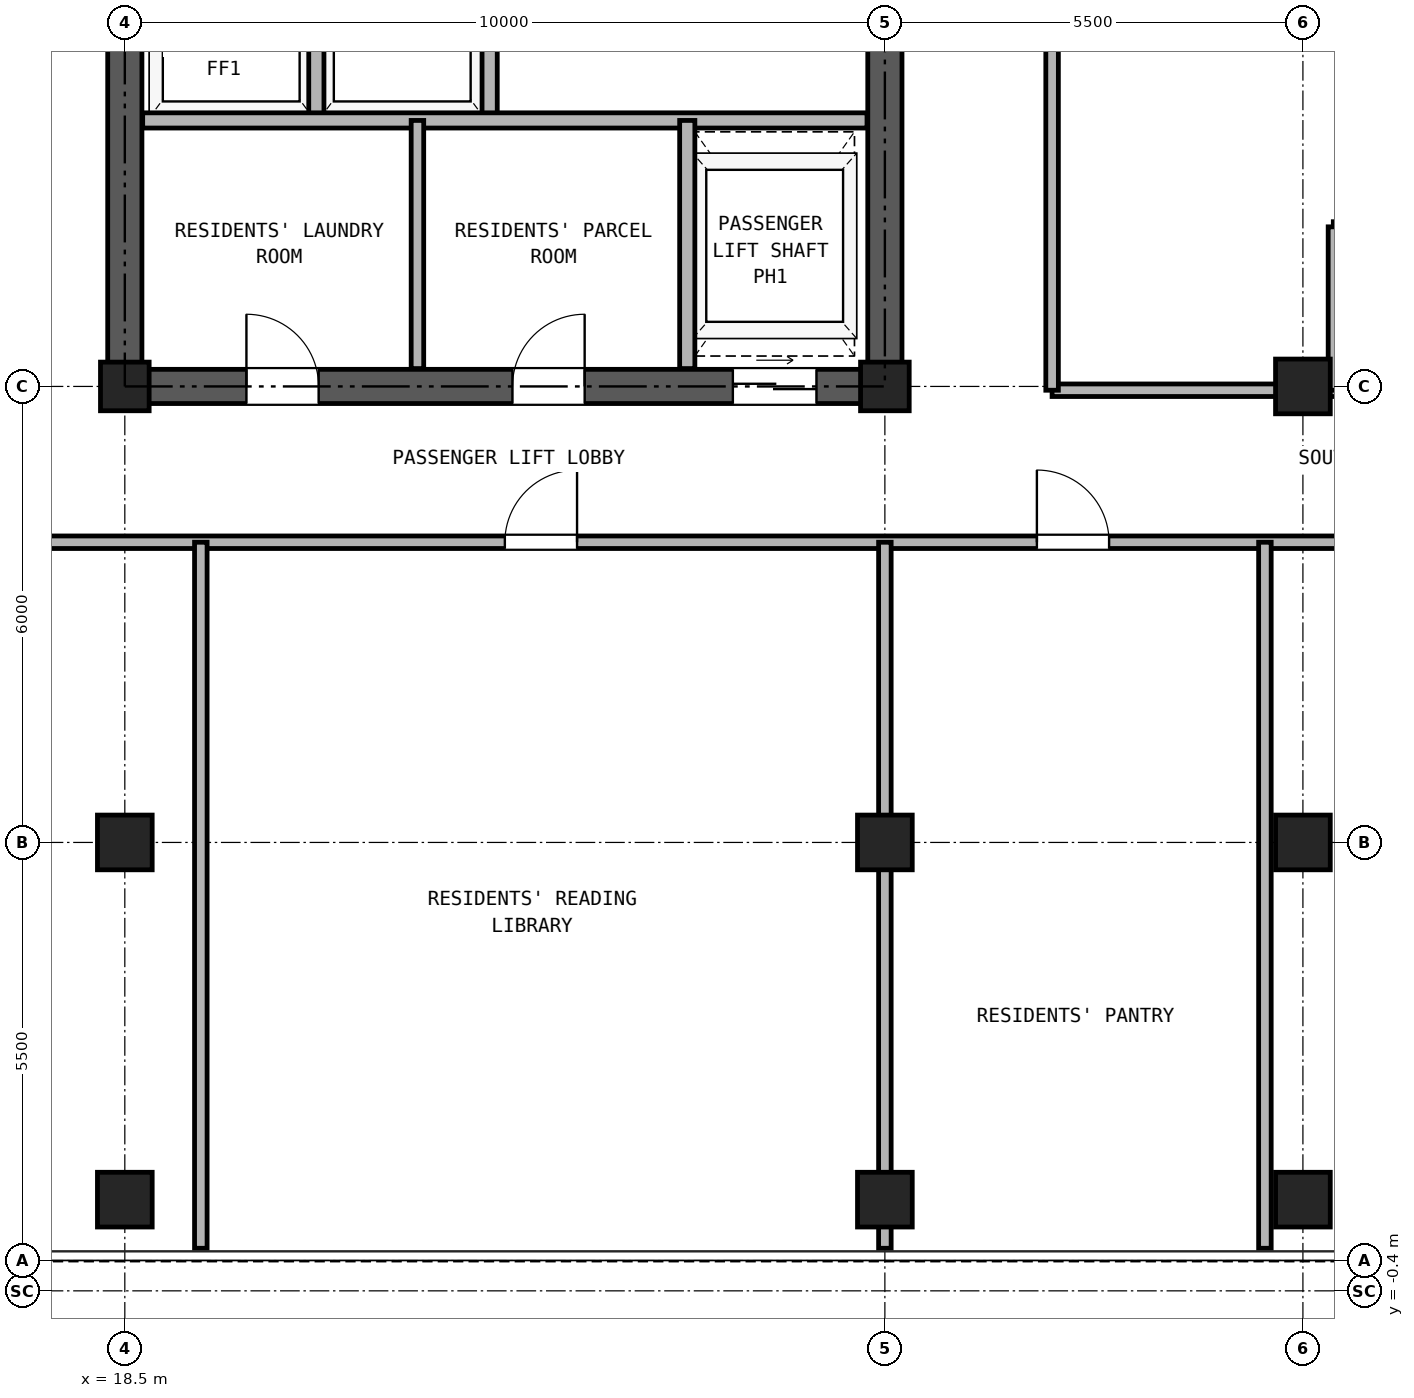
"""IFC4 building model, lengths in metres.
Left out: names, types, materials, properties, quantities, classifications, styles, units other than length and angle.
Written with IfcOpenShell. Run it as: python <this file> out.ifc"""

import sys

from ifc_helpers import new_model, si_unit, direction, frame, frame_2d, origin, origin_2d, place, context, subcontext, project, spatial, rectangle, hollow_rectangle, extrude, source, transform, mapped, element, fill, save


model = new_model("IFC4")
c1 = context("Model", 3, precision=1e-05, world=origin(), true_north=direction((0.0, 1.0)))
c2 = subcontext(c1, "Body", "Model", "MODEL_VIEW")
j1 = project(units=[si_unit("LENGTHUNIT", "METRE"), si_unit("PLANEANGLEUNIT", "RADIAN")], contexts=[c1])
p1 = place(None, origin())
s1 = spatial("IfcSite", under=j1, at=p1, CompositionType="ELEMENT")
p2 = place(p1, origin())
s2 = spatial("IfcBuilding", under=s1, at=p2, CompositionType="ELEMENT")
p3 = place(p2, frame((0.0, 0.0, 172.1)))
s3 = spatial("IfcBuildingStorey", under=s2, at=p3, CompositionType="ELEMENT", Elevation=172.1)
m1 = source(origin(), c2, "Body", "SweptSolid", [
    extrude(hollow_rectangle(XDim=0.72, YDim=0.72, WallThickness=0.04, at=origin_2d()), origin(), (0.0, 0.0, 1.0), 2.95),
])
for number, where, z_axis, x_axis in (
    (1, (18.5, 0.8, 0.0), (0.0, 0.0, 1.0), (1.0, 0.0, 0.0)),
    (2, (28.5, 0.8, 0.0), (0.0, 0.0, 1.0), (1.0, 0.0, 0.0)),
    (3, (34.0, 0.8, 0.0), (0.0, 0.0, 1.0), (1.0, 0.0, 0.0)),
    (4, (18.5, 5.5, 0.0), (0.0, 0.0, 1.0), (1.0, 0.0, 0.0)),
):
    element("IfcColumn", number, at=place(p3, frame(where, z_axis=z_axis, x_axis=x_axis)), inside=s3, PredefinedType="COLUMN", context=c2, shape_type="MappedRepresentation", body=[
        mapped(m1, transform((0.0, 0.0, 0.0), x_axis=(1.0, 0.0, 0.0), y_axis=(0.0, 1.0, 0.0), z_axis=(0.0, 0.0, 1.0), scale=1.0)),
    ])
m2 = source(origin(), c2, "Body", "SweptSolid", [
    extrude(hollow_rectangle(XDim=0.64, YDim=0.64, WallThickness=0.035, at=origin_2d()), origin(), (0.0, 0.0, 1.0), 2.95),
])
p4 = place(p3, frame((18.5, 11.5, 0.0), z_axis=(0.0, 0.0, 1.0), x_axis=(1.0, 0.0, 0.0)))
e5 = element("IfcColumn", 5, at=p4, inside=s3, PredefinedType="COLUMN", context=c2, shape_type="MappedRepresentation", body=[
    mapped(m2, transform((0.0, 0.0, 0.0), x_axis=(1.0, 0.0, 0.0), y_axis=(0.0, 1.0, 0.0), z_axis=(0.0, 0.0, 1.0), scale=1.0)),
])
p5 = place(p3, frame((28.5, 5.5, 0.0), z_axis=(0.0, 0.0, 1.0), x_axis=(1.0, 0.0, 0.0)))
e6 = element("IfcColumn", 6, at=p5, inside=s3, PredefinedType="COLUMN", context=c2, shape_type="MappedRepresentation", body=[
    mapped(m1, transform((0.0, 0.0, 0.0), x_axis=(1.0, 0.0, 0.0), y_axis=(0.0, 1.0, 0.0), z_axis=(0.0, 0.0, 1.0), scale=1.0)),
])
p6 = place(p3, frame((28.5, 11.5, 0.0), z_axis=(0.0, 0.0, 1.0), x_axis=(1.0, 0.0, 0.0)))
e7 = element("IfcColumn", 7, at=p6, inside=s3, PredefinedType="COLUMN", context=c2, shape_type="MappedRepresentation", body=[
    mapped(m2, transform((0.0, 0.0, 0.0), x_axis=(1.0, 0.0, 0.0), y_axis=(0.0, 1.0, 0.0), z_axis=(0.0, 0.0, 1.0), scale=1.0)),
])
for number, where, z_axis, x_axis in (
    (8, (34.0, 5.5, 0.0), (0.0, 0.0, 1.0), (1.0, 0.0, 0.0)),
    (9, (34.0, 11.5, 0.0), (0.0, 0.0, 1.0), (1.0, 0.0, 0.0)),
):
    element("IfcColumn", number, at=place(p3, frame(where, z_axis=z_axis, x_axis=x_axis)), inside=s3, PredefinedType="COLUMN", context=c2, shape_type="MappedRepresentation", body=[
        mapped(m1, transform((0.0, 0.0, 0.0), x_axis=(1.0, 0.0, 0.0), y_axis=(0.0, 1.0, 0.0), z_axis=(0.0, 0.0, 1.0), scale=1.0)),
    ])
p7 = place(p3, frame((18.275, 11.5, 0.0), z_axis=(0.0, 0.0, 1.0), x_axis=(1.0, 0.0, 0.0)))
e10 = element("IfcWall", 10, at=p7, inside=s3, PredefinedType="SHEAR", context=c2, shape_type="SweptSolid", body=[
    extrude(rectangle(XDim=10.45, YDim=0.45, at=frame_2d((5.225, 0.0))), origin(), (0.0, 0.0, 1.0), 2.95),
])
p8 = place(p7, frame((1.825, 0.0, 0.0)))
e11 = element("IfcOpeningElement", 11, at=p8, cuts=e10, PredefinedType="OPENING", context=c2, shape_type="SweptSolid", body=[
    extrude(rectangle(XDim=0.95, YDim=2.15, at=frame_2d((0.475, 1.075))), frame((0.0, 0.235, 0.0), z_axis=(0.0, -1.0, 0.0), x_axis=(1.0, 0.0, 0.0)), (0.0, 0.0, 1.0), 0.47),
])
p9 = place(p7, frame((5.325, 0.0, 0.0)))
e12 = element("IfcOpeningElement", 12, at=p9, cuts=e10, PredefinedType="OPENING", context=c2, shape_type="SweptSolid", body=[
    extrude(rectangle(XDim=0.95, YDim=2.15, at=frame_2d((0.475, 1.075))), frame((0.0, 0.235, 0.0), z_axis=(0.0, -1.0, 0.0), x_axis=(1.0, 0.0, 0.0)), (0.0, 0.0, 1.0), 0.47),
])
p10 = place(p7, frame((8.225, 0.0, 0.0)))
e13 = element("IfcOpeningElement", 13, at=p10, cuts=e10, PredefinedType="OPENING", context=c2, shape_type="SweptSolid", body=[
    extrude(rectangle(XDim=1.1, YDim=2.25, at=frame_2d((0.55, 1.125))), frame((0.0, 0.235, 0.0), z_axis=(0.0, -1.0, 0.0), x_axis=(1.0, 0.0, 0.0)), (0.0, 0.0, 1.0), 0.47),
])
p11 = place(p3, frame((18.5, 11.725, 0.0), z_axis=(0.0, 0.0, 1.0), x_axis=(0.0, 1.0, 0.0)))
e14 = element("IfcWall", 14, at=p11, inside=s3, PredefinedType="SHEAR", context=c2, shape_type="SweptSolid", body=[
    extrude(rectangle(XDim=16.8, YDim=0.45, at=frame_2d((8.4, 0.0))), origin(), (0.0, 0.0, 1.0), 2.95),
])
p12 = place(p11, frame((7.425, 0.0, 0.0)))
e15 = element("IfcOpeningElement", 15, at=p12, cuts=e14, PredefinedType="OPENING", context=c2, shape_type="SweptSolid", body=[
    extrude(rectangle(XDim=1.15, YDim=2.2, at=frame_2d((0.575, 1.1))), frame((0.0, 0.235, 0.0), z_axis=(0.0, -1.0, 0.0), x_axis=(1.0, 0.0, 0.0)), (0.0, 0.0, 1.0), 0.47),
])
p13 = place(p3, frame((28.5, 11.725, 0.0), z_axis=(0.0, 0.0, 1.0), x_axis=(0.0, 1.0, 0.0)))
e16 = element("IfcWall", 16, at=p13, inside=s3, PredefinedType="SHEAR", context=c2, shape_type="SweptSolid", body=[
    extrude(rectangle(XDim=16.8, YDim=0.45, at=frame_2d((8.4, 0.0))), origin(), (0.0, 0.0, 1.0), 2.95),
])
p14 = place(p13, frame((7.425, 0.0, 0.0)))
e17 = element("IfcOpeningElement", 17, at=p14, cuts=e16, PredefinedType="OPENING", context=c2, shape_type="SweptSolid", body=[
    extrude(rectangle(XDim=1.15, YDim=2.2, at=frame_2d((0.575, 1.1))), frame((0.0, 0.235, 0.0), z_axis=(0.0, -1.0, 0.0), x_axis=(1.0, 0.0, 0.0)), (0.0, 0.0, 1.0), 0.47),
])
for number, where, z_axis, x_axis in (
    (18, (21.02, 15.0, 0.0), (0.0, 0.0, 1.0), (0.0, 1.0, 0.0)),
    (19, (23.3, 15.0, 0.0), (0.0, 0.0, 1.0), (0.0, 1.0, 0.0)),
):
    element("IfcWall", number, at=place(p3, frame(where, z_axis=z_axis, x_axis=x_axis)), inside=s3, PredefinedType="PARTITIONING", context=c2, shape_type="SweptSolid", body=[
        extrude(rectangle(XDim=3.0, YDim=0.2, at=frame_2d((1.5, 0.0))), origin(), (0.0, 0.0, 1.0), 2.95),
    ])
p15 = place(p3, frame((18.735, 15.0, 0.0), z_axis=(0.0, 0.0, 1.0), x_axis=(1.0, 0.0, 0.0)))
e20 = element("IfcWall", 20, at=p15, inside=s3, PredefinedType="PARTITIONING", context=c2, shape_type="SweptSolid", body=[
    extrude(rectangle(XDim=9.53, YDim=0.2, at=frame_2d((4.765, 0.0))), origin(), (0.0, 0.0, 1.0), 2.95),
])
p16 = place(p3, frame((22.35, 11.735, 0.0), z_axis=(0.0, 0.0, 1.0), x_axis=(0.0, 1.0, 0.0)))
e21 = element("IfcWall", 21, at=p16, inside=s3, PredefinedType="PARTITIONING", context=c2, shape_type="SweptSolid", body=[
    extrude(rectangle(XDim=3.265, YDim=0.165, at=frame_2d((1.632, 0.0))), origin(), (0.0, 0.0, 1.0), 2.95),
])
p17 = place(p3, frame((25.9, 11.735, 0.0), z_axis=(0.0, 0.0, 1.0), x_axis=(0.0, 1.0, 0.0)))
e22 = element("IfcWall", 22, at=p17, inside=s3, PredefinedType="PARTITIONING", context=c2, shape_type="SweptSolid", body=[
    extrude(rectangle(XDim=3.265, YDim=0.2, at=frame_2d((1.632, 0.0))), origin(), (0.0, 0.0, 1.0), 2.95),
])
p18 = place(p3, frame((0.16, 9.45, 0.0), z_axis=(0.0, 0.0, 1.0), x_axis=(1.0, 0.0, 0.0)))
e23 = element("IfcWall", 23, at=p18, inside=s3, PredefinedType="PARTITIONING", context=c2, shape_type="SweptSolid", body=[
    extrude(rectangle(XDim=41.48, YDim=0.165, at=frame_2d((20.74, 0.0))), origin(), (0.0, 0.0, 1.0), 2.95),
])
p19 = place(p18, frame((12.89, 0.0, 0.0)))
e24 = element("IfcOpeningElement", 24, at=p19, cuts=e23, PredefinedType="OPENING", context=c2, shape_type="SweptSolid", body=[
    extrude(rectangle(XDim=0.95, YDim=2.15, at=frame_2d((0.475, 1.075))), frame((0.0, 0.093, 0.0), z_axis=(0.0, -1.0, 0.0), x_axis=(1.0, 0.0, 0.0)), (0.0, 0.0, 1.0), 0.185),
])
p20 = place(p18, frame((23.34, 0.0, 0.0)))
e25 = element("IfcOpeningElement", 25, at=p20, cuts=e23, PredefinedType="OPENING", context=c2, shape_type="SweptSolid", body=[
    extrude(rectangle(XDim=0.95, YDim=2.15, at=frame_2d((0.475, 1.075))), frame((0.0, 0.093, 0.0), z_axis=(0.0, -1.0, 0.0), x_axis=(1.0, 0.0, 0.0)), (0.0, 0.0, 1.0), 0.185),
])
p21 = place(p18, frame((30.34, 0.0, 0.0)))
e26 = element("IfcOpeningElement", 26, at=p21, cuts=e23, PredefinedType="OPENING", context=c2, shape_type="SweptSolid", body=[
    extrude(rectangle(XDim=0.95, YDim=2.15, at=frame_2d((0.475, 1.075))), frame((0.0, 0.093, 0.0), z_axis=(0.0, -1.0, 0.0), x_axis=(1.0, 0.0, 0.0)), (0.0, 0.0, 1.0), 0.185),
])
p22 = place(p18, frame((35.19, 0.0, 0.0)))
e27 = element("IfcOpeningElement", 27, at=p22, cuts=e23, PredefinedType="OPENING", context=c2, shape_type="SweptSolid", body=[
    extrude(rectangle(XDim=0.95, YDim=2.15, at=frame_2d((0.475, 1.075))), frame((0.0, 0.093, 0.0), z_axis=(0.0, -1.0, 0.0), x_axis=(1.0, 0.0, 0.0)), (0.0, 0.0, 1.0), 0.185),
])
p23 = place(p3, frame((30.7, 11.45, 0.0), z_axis=(0.0, 0.0, 1.0), x_axis=(1.0, 0.0, 0.0)))
e28 = element("IfcWall", 28, at=p23, inside=s3, PredefinedType="PARTITIONING", context=c2, shape_type="SweptSolid", body=[
    extrude(rectangle(XDim=7.5, YDim=0.165, at=frame_2d((3.75, 0.0))), origin(), (0.0, 0.0, 1.0), 2.323),
])
p24 = place(p3, frame((30.7, 11.45, 0.0), z_axis=(0.0, 0.0, 1.0), x_axis=(0.0, 1.0, 0.0)))
e29 = element("IfcWall", 29, at=p24, inside=s3, PredefinedType="PARTITIONING", context=c2, shape_type="SweptSolid", body=[
    extrude(rectangle(XDim=23.69, YDim=0.165, at=frame_2d((11.845, 0.0))), origin(), (0.0, 0.0, 1.0), 2.95),
])
p25 = place(p24, frame((4.525, 0.0, 0.0)))
e30 = element("IfcOpeningElement", 30, at=p25, cuts=e29, PredefinedType="OPENING", context=c2, shape_type="SweptSolid", body=[
    extrude(rectangle(XDim=1.0, YDim=2.15, at=frame_2d((0.5, 1.075))), frame((0.0, 0.093, 0.0), z_axis=(0.0, -1.0, 0.0), x_axis=(1.0, 0.0, 0.0)), (0.0, 0.0, 1.0), 0.185),
])
p26 = place(p24, frame((14.075, 0.0, 0.0)))
e31 = element("IfcOpeningElement", 31, at=p26, cuts=e29, PredefinedType="OPENING", context=c2, shape_type="SweptSolid", body=[
    extrude(rectangle(XDim=1.0, YDim=2.15, at=frame_2d((0.5, 1.075))), frame((0.0, 0.093, 0.0), z_axis=(0.0, -1.0, 0.0), x_axis=(1.0, 0.0, 0.0)), (0.0, 0.0, 1.0), 0.185),
])
p27 = place(p3, frame((19.5, 0.16, 0.0), z_axis=(0.0, 0.0, 1.0), x_axis=(0.0, 1.0, 0.0)))
e32 = element("IfcWall", 32, at=p27, inside=s3, PredefinedType="PARTITIONING", context=c2, shape_type="SweptSolid", body=[
    extrude(rectangle(XDim=9.29, YDim=0.165, at=frame_2d((4.645, 0.0))), origin(), (0.0, 0.0, 1.0), 2.95),
])
p28 = place(p3, frame((28.5, 0.16, 0.0), z_axis=(0.0, 0.0, 1.0), x_axis=(0.0, 1.0, 0.0)))
e33 = element("IfcWall", 33, at=p28, inside=s3, PredefinedType="PARTITIONING", context=c2, shape_type="SweptSolid", body=[
    extrude(rectangle(XDim=9.29, YDim=0.165, at=frame_2d((4.645, 0.0))), origin(), (0.0, 0.0, 1.0), 2.323),
])
p29 = place(p3, frame((33.5, 0.16, 0.0), z_axis=(0.0, 0.0, 1.0), x_axis=(0.0, 1.0, 0.0)))
e34 = element("IfcWall", 34, at=p29, inside=s3, PredefinedType="PARTITIONING", context=c2, shape_type="SweptSolid", body=[
    extrude(rectangle(XDim=9.29, YDim=0.165, at=frame_2d((4.645, 0.0))), origin(), (0.0, 0.0, 1.0), 2.95),
])
p30 = place(p3, frame((34.4, 13.6, 0.0), z_axis=(0.0, 0.0, 1.0), x_axis=(1.0, 0.0, 0.0)))
e35 = element("IfcWall", 35, at=p30, inside=s3, PredefinedType="PARTITIONING", context=c2, shape_type="SweptSolid", body=[
    extrude(rectangle(XDim=1.85, YDim=0.135, at=frame_2d((0.925, 0.0))), origin(), (0.0, 0.0, 1.0), 2.95),
])
p31 = place(p30, frame((0.445, 0.0, 0.0)))
e36 = element("IfcOpeningElement", 36, at=p31, cuts=e35, PredefinedType="OPENING", context=c2, shape_type="SweptSolid", body=[
    extrude(rectangle(XDim=0.95, YDim=2.15, at=frame_2d((0.475, 1.075))), frame((0.0, 0.077, 0.0), z_axis=(0.0, -1.0, 0.0), x_axis=(1.0, 0.0, 0.0)), (0.0, 0.0, 1.0), 0.155),
])
p32 = place(p3, frame((34.4, 11.45, 0.0), z_axis=(0.0, 0.0, 1.0), x_axis=(0.0, 1.0, 0.0)))
e37 = element("IfcWall", 37, at=p32, inside=s3, PredefinedType="PARTITIONING", context=c2, shape_type="SweptSolid", body=[
    extrude(rectangle(XDim=2.15, YDim=0.135, at=frame_2d((1.075, 0.0))), origin(), (0.0, 0.0, 1.0), 2.95),
])
p33 = place(p8, frame((0.95, 0.0, 0.0), z_axis=(0.0, 0.0, 1.0), x_axis=(-1.0, 0.0, 0.0)))
e38 = element("IfcDoor", 38, at=p33, inside=s3, OperationType="SINGLE_SWING_LEFT", PredefinedType="DOOR", context=c2, shape_type="SweptSolid", body=[
    extrude(rectangle(XDim=0.95, YDim=2.15, at=frame_2d((0.475, 1.075))), frame((0.0, 0.025, 0.0), z_axis=(0.0, -1.0, 0.0), x_axis=(1.0, 0.0, 0.0)), (0.0, 0.0, 1.0), 0.05),
])
fill(e11, e38)
p34 = place(p9, frame((0.95, 0.0, 0.0), z_axis=(0.0, 0.0, 1.0), x_axis=(-1.0, 0.0, 0.0)))
e39 = element("IfcDoor", 39, at=p34, inside=s3, OperationType="SINGLE_SWING_RIGHT", PredefinedType="DOOR", context=c2, shape_type="SweptSolid", body=[
    extrude(rectangle(XDim=0.95, YDim=2.15, at=frame_2d((0.475, 1.075))), frame((0.0, 0.025, 0.0), z_axis=(0.0, -1.0, 0.0), x_axis=(1.0, 0.0, 0.0)), (0.0, 0.0, 1.0), 0.05),
])
fill(e12, e39)
p35 = place(p10, frame((1.1, 0.0, 0.0), z_axis=(0.0, 0.0, 1.0), x_axis=(-1.0, 0.0, 0.0)))
e40 = element("IfcDoor", 40, at=p35, inside=s3, OperationType="DOUBLE_DOOR_SLIDING", PredefinedType="DOOR", context=c2, shape_type="SweptSolid", body=[
    extrude(rectangle(XDim=1.1, YDim=2.25, at=frame_2d((0.55, 1.125))), frame((0.0, 0.025, 0.0), z_axis=(0.0, -1.0, 0.0), x_axis=(1.0, 0.0, 0.0)), (0.0, 0.0, 1.0), 0.05),
])
fill(e13, e40)
p36 = place(p20, frame((0.95, 0.0, 0.0), z_axis=(0.0, 0.0, 1.0), x_axis=(-1.0, 0.0, 0.0)))
e41 = element("IfcDoor", 41, at=p36, inside=s3, OperationType="SINGLE_SWING_RIGHT", PredefinedType="DOOR", context=c2, shape_type="SweptSolid", body=[
    extrude(rectangle(XDim=0.95, YDim=2.15, at=frame_2d((0.475, 1.075))), frame((0.0, 0.025, 0.0), z_axis=(0.0, -1.0, 0.0), x_axis=(1.0, 0.0, 0.0)), (0.0, 0.0, 1.0), 0.05),
])
fill(e25, e41)
p37 = place(p21, frame((0.95, 0.0, 0.0), z_axis=(0.0, 0.0, 1.0), x_axis=(-1.0, 0.0, 0.0)))
e42 = element("IfcDoor", 42, at=p37, inside=s3, OperationType="SINGLE_SWING_LEFT", PredefinedType="DOOR", context=c2, shape_type="SweptSolid", body=[
    extrude(rectangle(XDim=0.95, YDim=2.15, at=frame_2d((0.475, 1.075))), frame((0.0, 0.025, 0.0), z_axis=(0.0, -1.0, 0.0), x_axis=(1.0, 0.0, 0.0)), (0.0, 0.0, 1.0), 0.05),
])
fill(e26, e42)
save(model, sys.argv[1])
